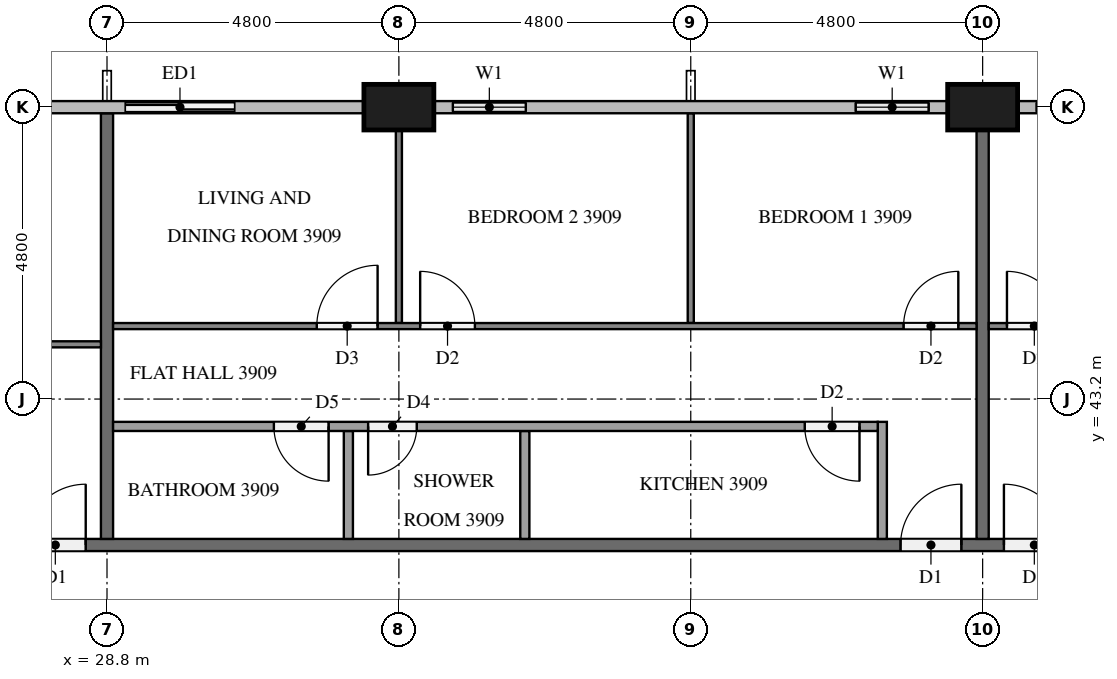
"""IFC4 building model, lengths in metres.
Left out: names, types, materials, properties, quantities, classifications, styles, units other than length and angle.
Written with IfcOpenShell. Run it as: python <this file> out.ifc"""

import sys

from ifc_helpers import new_model, si_unit, direction, frame, frame_2d, origin, origin_2d, place, context, subcontext, project, spatial, rectangle, extrude, element, fill, save


model = new_model("IFC4")
c1 = context("Model", 3, precision=1e-05, world=origin(), true_north=direction((0.0, 1.0)))
c2 = subcontext(c1, "Body", "Model", "MODEL_VIEW")
j1 = project(units=[si_unit("LENGTHUNIT", "METRE"), si_unit("PLANEANGLEUNIT", "RADIAN")], contexts=[c1])
p1 = place(None, origin())
s1 = spatial("IfcSite", under=j1, at=p1, CompositionType="ELEMENT")
p2 = place(p1, origin())
s2 = spatial("IfcBuilding", under=s1, at=p2, CompositionType="ELEMENT")
p3 = place(p2, frame((0.0, 0.0, 152.5)))
s3 = spatial("IfcBuildingStorey", under=s2, at=p3, CompositionType="ELEMENT", Elevation=152.5)
for number, where, z_axis, x_axis in (
    (1, (43.2, 48.0, 0.0), (0.0, 0.0, 1.0), (1.0, 0.0, 0.0)),
    (2, (33.6, 48.0, 0.0), (0.0, 0.0, 1.0), (1.0, 0.0, 0.0)),
):
    element("IfcColumn", number, at=place(p3, frame(where, z_axis=z_axis, x_axis=x_axis)), inside=s3, PredefinedType="COLUMN", context=c2, shape_type="SweptSolid", body=[
        extrude(rectangle(XDim=1.15, YDim=0.75, at=origin_2d()), origin(), (0.0, 0.0, 1.0), 3.2),
    ])
p4 = place(p3, frame((45.6, 48.0, 0.0), z_axis=(0.0, 0.0, 1.0), x_axis=(-1.0, 0.0, 0.0)))
e3 = element("IfcWall", 3, at=p4, inside=s3, PredefinedType="SOLIDWALL", context=c2, shape_type="SweptSolid", body=[
    extrude(rectangle(XDim=1.825, YDim=0.15, at=frame_2d((0.913, 0.0))), origin(), (0.0, 0.0, 1.0), 3.2),
])
p5 = place(p4, frame((0.312, 0.0, 0.9)))
e4 = element("IfcOpeningElement", 4, at=p5, cuts=e3, PredefinedType="OPENING", context=c2, shape_type="SweptSolid", body=[
    extrude(rectangle(XDim=1.2, YDim=1.4, at=frame_2d((0.6, 0.7))), frame((0.0, 0.085, 0.0), z_axis=(0.0, -1.0, 0.0), x_axis=(1.0, 0.0, 0.0)), (0.0, 0.0, 1.0), 0.17),
])
p6 = place(p3, frame((42.625, 48.0, 0.0), z_axis=(0.0, 0.0, 1.0), x_axis=(-1.0, 0.0, 0.0)))
e5 = element("IfcWall", 5, at=p6, inside=s3, PredefinedType="SOLIDWALL", context=c2, shape_type="SweptSolid", body=[
    extrude(rectangle(XDim=1.825, YDim=0.15, at=frame_2d((0.913, 0.0))), origin(), (0.0, 0.0, 1.0), 3.2),
])
p7 = place(p6, frame((0.312, 0.0, 0.9)))
e6 = element("IfcOpeningElement", 6, at=p7, cuts=e5, PredefinedType="OPENING", context=c2, shape_type="SweptSolid", body=[
    extrude(rectangle(XDim=1.2, YDim=1.4, at=frame_2d((0.6, 0.7))), frame((0.0, 0.085, 0.0), z_axis=(0.0, -1.0, 0.0), x_axis=(1.0, 0.0, 0.0)), (0.0, 0.0, 1.0), 0.17),
])
p8 = place(p3, frame((36.0, 48.0, 0.0), z_axis=(0.0, 0.0, 1.0), x_axis=(-1.0, 0.0, 0.0)))
e7 = element("IfcWall", 7, at=p8, inside=s3, PredefinedType="SOLIDWALL", context=c2, shape_type="SweptSolid", body=[
    extrude(rectangle(XDim=1.825, YDim=0.15, at=frame_2d((0.913, 0.0))), origin(), (0.0, 0.0, 1.0), 3.2),
])
p9 = place(p8, frame((0.312, 0.0, 0.9)))
e8 = element("IfcOpeningElement", 8, at=p9, cuts=e7, PredefinedType="OPENING", context=c2, shape_type="SweptSolid", body=[
    extrude(rectangle(XDim=1.2, YDim=1.4, at=frame_2d((0.6, 0.7))), frame((0.0, 0.085, 0.0), z_axis=(0.0, -1.0, 0.0), x_axis=(1.0, 0.0, 0.0)), (0.0, 0.0, 1.0), 0.17),
])
p10 = place(p3, frame((31.2, 48.0, 0.0), z_axis=(0.0, 0.0, 1.0), x_axis=(-1.0, 0.0, 0.0)))
e9 = element("IfcWall", 9, at=p10, inside=s3, PredefinedType="SOLIDWALL", context=c2, shape_type="SweptSolid", body=[
    extrude(rectangle(XDim=2.4, YDim=0.15, at=frame_2d((1.2, 0.0))), origin(), (0.0, 0.0, 1.0), 3.2),
])
p11 = place(p10, frame((0.3, 0.0, 0.0)))
e10 = element("IfcOpeningElement", 10, at=p11, cuts=e9, PredefinedType="OPENING", context=c2, shape_type="SweptSolid", body=[
    extrude(rectangle(XDim=1.8, YDim=2.4, at=frame_2d((0.9, 1.2))), frame((0.0, 0.085, 0.0), z_axis=(0.0, -1.0, 0.0), x_axis=(1.0, 0.0, 0.0)), (0.0, 0.0, 1.0), 0.17),
])
p12 = place(p3, frame((11.9, 40.8, 0.0), z_axis=(0.0, 0.0, 1.0), x_axis=(1.0, 0.0, 0.0)))
e11 = element("IfcWall", 11, at=p12, inside=s3, PredefinedType="PARTITIONING", context=c2, shape_type="SweptSolid", body=[
    extrude(rectangle(XDim=38.6, YDim=0.2, at=frame_2d((19.3, 0.0))), origin(), (0.0, 0.0, 1.0), 3.2),
])
p13 = place(p12, frame((31.65, 0.0, 0.0)))
e12 = element("IfcOpeningElement", 12, at=p13, cuts=e11, PredefinedType="OPENING", context=c2, shape_type="SweptSolid", body=[
    extrude(rectangle(XDim=1.0, YDim=2.1, at=frame_2d((0.5, 1.05))), frame((0.0, 0.11, 0.0), z_axis=(0.0, -1.0, 0.0), x_axis=(1.0, 0.0, 0.0)), (0.0, 0.0, 1.0), 0.22),
])
p14 = place(p12, frame((29.95, 0.0, 0.0)))
e13 = element("IfcOpeningElement", 13, at=p14, cuts=e11, PredefinedType="OPENING", context=c2, shape_type="SweptSolid", body=[
    extrude(rectangle(XDim=1.0, YDim=2.1, at=frame_2d((0.5, 1.05))), frame((0.0, 0.11, 0.0), z_axis=(0.0, -1.0, 0.0), x_axis=(1.0, 0.0, 0.0)), (0.0, 0.0, 1.0), 0.22),
])
p15 = place(p12, frame((15.55, 0.0, 0.0)))
e14 = element("IfcOpeningElement", 14, at=p15, cuts=e11, PredefinedType="OPENING", context=c2, shape_type="SweptSolid", body=[
    extrude(rectangle(XDim=1.0, YDim=2.1, at=frame_2d((0.5, 1.05))), frame((0.0, 0.11, 0.0), z_axis=(0.0, -1.0, 0.0), x_axis=(1.0, 0.0, 0.0)), (0.0, 0.0, 1.0), 0.22),
])
p16 = place(p12, frame((1.15, 0.0, 0.0)))
e15 = element("IfcOpeningElement", 15, at=p16, cuts=e11, PredefinedType="OPENING", context=c2, shape_type="SweptSolid", body=[
    extrude(rectangle(XDim=1.0, YDim=2.1, at=frame_2d((0.5, 1.05))), frame((0.0, 0.11, 0.0), z_axis=(0.0, -1.0, 0.0), x_axis=(1.0, 0.0, 0.0)), (0.0, 0.0, 1.0), 0.22),
])
p17 = place(p3, frame((43.2, 47.625, 0.0), z_axis=(0.0, 0.0, 1.0), x_axis=(0.0, -1.0, 0.0)))
e16 = element("IfcWall", 16, at=p17, inside=s3, PredefinedType="PARTITIONING", context=c2, shape_type="SweptSolid", body=[
    extrude(rectangle(XDim=6.725, YDim=0.2, at=frame_2d((3.363, 0.0))), origin(), (0.0, 0.0, 1.0), 3.2),
])
p18 = place(p3, frame((28.8, 47.9, 0.0), z_axis=(0.0, 0.0, 1.0), x_axis=(0.0, -1.0, 0.0)))
e17 = element("IfcWall", 17, at=p18, inside=s3, PredefinedType="PARTITIONING", context=c2, shape_type="SweptSolid", body=[
    extrude(rectangle(XDim=7.0, YDim=0.2, at=frame_2d((3.5, 0.0))), origin(), (0.0, 0.0, 1.0), 3.2),
])
p19 = place(p3, frame((43.3, 44.4, 0.0), z_axis=(0.0, 0.0, 1.0), x_axis=(1.0, 0.0, 0.0)))
e18 = element("IfcWall", 18, at=p19, inside=s3, PredefinedType="PARTITIONING", context=c2, shape_type="SweptSolid", body=[
    extrude(rectangle(XDim=13.878, YDim=0.1, at=frame_2d((6.939, 0.0))), origin(), (0.0, 0.0, 1.0), 3.2),
])
p20 = place(p19, frame((0.3, 0.0, 0.0)))
e19 = element("IfcOpeningElement", 19, at=p20, cuts=e18, PredefinedType="OPENING", context=c2, shape_type="SweptSolid", body=[
    extrude(rectangle(XDim=0.9, YDim=2.1, at=frame_2d((0.45, 1.05))), frame((0.0, 0.06, 0.0), z_axis=(0.0, -1.0, 0.0), x_axis=(1.0, 0.0, 0.0)), (0.0, 0.0, 1.0), 0.12),
])
p21 = place(p19, frame((8.15, 0.0, 0.0)))
e20 = element("IfcOpeningElement", 20, at=p21, cuts=e18, PredefinedType="OPENING", context=c2, shape_type="SweptSolid", body=[
    extrude(rectangle(XDim=1.0, YDim=2.1, at=frame_2d((0.5, 1.05))), frame((0.0, 0.06, 0.0), z_axis=(0.0, -1.0, 0.0), x_axis=(1.0, 0.0, 0.0)), (0.0, 0.0, 1.0), 0.12),
])
p22 = place(p19, frame((9.85, 0.0, 0.0)))
e21 = element("IfcOpeningElement", 21, at=p22, cuts=e18, PredefinedType="OPENING", context=c2, shape_type="SweptSolid", body=[
    extrude(rectangle(XDim=0.9, YDim=2.1, at=frame_2d((0.45, 1.05))), frame((0.0, 0.06, 0.0), z_axis=(0.0, -1.0, 0.0), x_axis=(1.0, 0.0, 0.0)), (0.0, 0.0, 1.0), 0.12),
])
p23 = place(p3, frame((38.4, 44.45, 0.0), z_axis=(0.0, 0.0, 1.0), x_axis=(0.0, 1.0, 0.0)))
e22 = element("IfcWall", 22, at=p23, inside=s3, PredefinedType="PARTITIONING", context=c2, shape_type="SweptSolid", body=[
    extrude(rectangle(XDim=3.45, YDim=0.1, at=frame_2d((1.725, 0.0))), origin(), (0.0, 0.0, 1.0), 3.2),
])
p24 = place(p3, frame((33.6, 44.45, 0.0), z_axis=(0.0, 0.0, 1.0), x_axis=(0.0, 1.0, 0.0)))
e23 = element("IfcWall", 23, at=p24, inside=s3, PredefinedType="PARTITIONING", context=c2, shape_type="SweptSolid", body=[
    extrude(rectangle(XDim=3.175, YDim=0.1, at=frame_2d((1.587, 0.0))), origin(), (0.0, 0.0, 1.0), 3.2),
])
p25 = place(p3, frame((28.9, 44.4, 0.0), z_axis=(0.0, 0.0, 1.0), x_axis=(1.0, 0.0, 0.0)))
e24 = element("IfcWall", 24, at=p25, inside=s3, PredefinedType="PARTITIONING", context=c2, shape_type="SweptSolid", body=[
    extrude(rectangle(XDim=14.2, YDim=0.1, at=frame_2d((7.1, 0.0))), origin(), (0.0, 0.0, 1.0), 3.2),
])
p26 = place(p25, frame((13.0, 0.0, 0.0)))
e25 = element("IfcOpeningElement", 25, at=p26, cuts=e24, PredefinedType="OPENING", context=c2, shape_type="SweptSolid", body=[
    extrude(rectangle(XDim=0.9, YDim=2.1, at=frame_2d((0.45, 1.05))), frame((0.0, 0.06, 0.0), z_axis=(0.0, -1.0, 0.0), x_axis=(1.0, 0.0, 0.0)), (0.0, 0.0, 1.0), 0.12),
])
p27 = place(p25, frame((5.05, 0.0, 0.0)))
e26 = element("IfcOpeningElement", 26, at=p27, cuts=e24, PredefinedType="OPENING", context=c2, shape_type="SweptSolid", body=[
    extrude(rectangle(XDim=0.9, YDim=2.1, at=frame_2d((0.45, 1.05))), frame((0.0, 0.06, 0.0), z_axis=(0.0, -1.0, 0.0), x_axis=(1.0, 0.0, 0.0)), (0.0, 0.0, 1.0), 0.12),
])
p28 = place(p25, frame((3.35, 0.0, 0.0)))
e27 = element("IfcOpeningElement", 27, at=p28, cuts=e24, PredefinedType="OPENING", context=c2, shape_type="SweptSolid", body=[
    extrude(rectangle(XDim=1.0, YDim=2.1, at=frame_2d((0.5, 1.05))), frame((0.0, 0.06, 0.0), z_axis=(0.0, -1.0, 0.0), x_axis=(1.0, 0.0, 0.0)), (0.0, 0.0, 1.0), 0.12),
])
for number, where, z_axis, x_axis in (
    (28, (35.671, 40.9, 0.0), (0.0, 0.0, 1.0), (0.0, 1.0, 0.0)),
    (29, (32.769, 40.9, 0.0), (0.0, 0.0, 1.0), (0.0, 1.0, 0.0)),
):
    element("IfcWall", number, at=place(p3, frame(where, z_axis=z_axis, x_axis=x_axis)), inside=s3, PredefinedType="PARTITIONING", context=c2, shape_type="SweptSolid", body=[
        extrude(rectangle(XDim=1.775, YDim=0.15, at=frame_2d((0.888, 0.0))), origin(), (0.0, 0.0, 1.0), 3.2),
    ])
p29 = place(p3, frame((41.55, 40.9, 0.0), z_axis=(0.0, 0.0, 1.0), x_axis=(0.0, 1.0, 0.0)))
e30 = element("IfcWall", 30, at=p29, inside=s3, PredefinedType="PARTITIONING", context=c2, shape_type="SweptSolid", body=[
    extrude(rectangle(XDim=1.925, YDim=0.15, at=frame_2d((0.962, 0.0))), origin(), (0.0, 0.0, 1.0), 3.2),
])
p30 = place(p3, frame((41.475, 42.75, 0.0), z_axis=(0.0, 0.0, 1.0), x_axis=(-1.0, 0.0, 0.0)))
e31 = element("IfcWall", 31, at=p30, inside=s3, PredefinedType="PARTITIONING", context=c2, shape_type="SweptSolid", body=[
    extrude(rectangle(XDim=12.575, YDim=0.15, at=frame_2d((6.288, 0.0))), origin(), (0.0, 0.0, 1.0), 3.2),
])
p31 = place(p30, frame((0.3, 0.0, 0.0)))
e32 = element("IfcOpeningElement", 32, at=p31, cuts=e31, PredefinedType="OPENING", context=c2, shape_type="SweptSolid", body=[
    extrude(rectangle(XDim=0.9, YDim=2.1, at=frame_2d((0.45, 1.05))), frame((0.0, 0.085, 0.0), z_axis=(0.0, -1.0, 0.0), x_axis=(1.0, 0.0, 0.0)), (0.0, 0.0, 1.0), 0.17),
])
p32 = place(p30, frame((7.581, 0.0, 0.0)))
e33 = element("IfcOpeningElement", 33, at=p32, cuts=e31, PredefinedType="OPENING", context=c2, shape_type="SweptSolid", body=[
    extrude(rectangle(XDim=0.8, YDim=2.1, at=frame_2d((0.4, 1.05))), frame((0.0, 0.085, 0.0), z_axis=(0.0, -1.0, 0.0), x_axis=(1.0, 0.0, 0.0)), (0.0, 0.0, 1.0), 0.17),
])
p33 = place(p30, frame((9.031, 0.0, 0.0)))
e34 = element("IfcOpeningElement", 34, at=p33, cuts=e31, PredefinedType="OPENING", context=c2, shape_type="SweptSolid", body=[
    extrude(rectangle(XDim=0.9, YDim=2.1, at=frame_2d((0.45, 1.05))), frame((0.0, 0.085, 0.0), z_axis=(0.0, -1.0, 0.0), x_axis=(1.0, 0.0, 0.0)), (0.0, 0.0, 1.0), 0.17),
])
p34 = place(p3, frame((14.5, 44.1, 0.0), z_axis=(0.0, 0.0, 1.0), x_axis=(1.0, 0.0, 0.0)))
e35 = element("IfcWall", 35, at=p34, inside=s3, PredefinedType="PARTITIONING", context=c2, shape_type="SweptSolid", body=[
    extrude(rectangle(XDim=14.2, YDim=0.1, at=frame_2d((7.1, 0.0))), origin(), (0.0, 0.0, 1.0), 3.2),
])
p35 = place(p34, frame((9.85, 0.0, 0.0)))
e36 = element("IfcOpeningElement", 36, at=p35, cuts=e35, PredefinedType="OPENING", context=c2, shape_type="SweptSolid", body=[
    extrude(rectangle(XDim=0.9, YDim=2.1, at=frame_2d((0.45, 1.05))), frame((0.0, 0.06, 0.0), z_axis=(0.0, -1.0, 0.0), x_axis=(1.0, 0.0, 0.0)), (0.0, 0.0, 1.0), 0.12),
])
p36 = place(p34, frame((8.25, 0.0, 0.0)))
e37 = element("IfcOpeningElement", 37, at=p36, cuts=e35, PredefinedType="OPENING", context=c2, shape_type="SweptSolid", body=[
    extrude(rectangle(XDim=0.9, YDim=2.1, at=frame_2d((0.45, 1.05))), frame((0.0, 0.06, 0.0), z_axis=(0.0, -1.0, 0.0), x_axis=(1.0, 0.0, 0.0)), (0.0, 0.0, 1.0), 0.12),
])
p37 = place(p34, frame((0.3, 0.0, 0.0)))
e38 = element("IfcOpeningElement", 38, at=p37, cuts=e35, PredefinedType="OPENING", context=c2, shape_type="SweptSolid", body=[
    extrude(rectangle(XDim=1.0, YDim=2.1, at=frame_2d((0.5, 1.05))), frame((0.0, 0.06, 0.0), z_axis=(0.0, -1.0, 0.0), x_axis=(1.0, 0.0, 0.0)), (0.0, 0.0, 1.0), 0.12),
])
p38 = place(p5, origin())
e39 = element("IfcWindow", 39, at=p38, inside=s3, PartitioningType="SINGLE_PANEL", PredefinedType="WINDOW", context=c2, shape_type="SweptSolid", body=[
    extrude(rectangle(XDim=1.2, YDim=1.4, at=frame_2d((0.6, 0.7))), frame((0.0, 0.03, 0.0), z_axis=(0.0, -1.0, 0.0), x_axis=(1.0, 0.0, 0.0)), (0.0, 0.0, 1.0), 0.06),
])
fill(e4, e39)
p39 = place(p7, origin())
e40 = element("IfcWindow", 40, at=p39, inside=s3, PartitioningType="SINGLE_PANEL", PredefinedType="WINDOW", context=c2, shape_type="SweptSolid", body=[
    extrude(rectangle(XDim=1.2, YDim=1.4, at=frame_2d((0.6, 0.7))), frame((0.0, 0.03, 0.0), z_axis=(0.0, -1.0, 0.0), x_axis=(1.0, 0.0, 0.0)), (0.0, 0.0, 1.0), 0.06),
])
fill(e6, e40)
p40 = place(p9, origin())
e41 = element("IfcWindow", 41, at=p40, inside=s3, PartitioningType="SINGLE_PANEL", PredefinedType="WINDOW", context=c2, shape_type="SweptSolid", body=[
    extrude(rectangle(XDim=1.2, YDim=1.4, at=frame_2d((0.6, 0.7))), frame((0.0, 0.03, 0.0), z_axis=(0.0, -1.0, 0.0), x_axis=(1.0, 0.0, 0.0)), (0.0, 0.0, 1.0), 0.06),
])
fill(e8, e41)
p41 = place(p11, origin())
e42 = element("IfcDoor", 42, at=p41, inside=s3, OperationType="SLIDING_TO_LEFT", PredefinedType="DOOR", context=c2, shape_type="SweptSolid", body=[
    extrude(rectangle(XDim=1.8, YDim=2.4, at=frame_2d((0.9, 1.2))), frame((0.0, 0.025, 0.0), z_axis=(0.0, -1.0, 0.0), x_axis=(1.0, 0.0, 0.0)), (0.0, 0.0, 1.0), 0.05),
])
fill(e10, e42)
p42 = place(p13, origin())
e43 = element("IfcDoor", 43, at=p42, inside=s3, OperationType="SINGLE_SWING_LEFT", PredefinedType="DOOR", context=c2, shape_type="SweptSolid", body=[
    extrude(rectangle(XDim=1.0, YDim=2.1, at=frame_2d((0.5, 1.05))), frame((0.0, 0.025, 0.0), z_axis=(0.0, -1.0, 0.0), x_axis=(1.0, 0.0, 0.0)), (0.0, 0.0, 1.0), 0.05),
])
fill(e12, e43)
p43 = place(p14, origin())
e44 = element("IfcDoor", 44, at=p43, inside=s3, OperationType="SINGLE_SWING_RIGHT", PredefinedType="DOOR", context=c2, shape_type="SweptSolid", body=[
    extrude(rectangle(XDim=1.0, YDim=2.1, at=frame_2d((0.5, 1.05))), frame((0.0, 0.025, 0.0), z_axis=(0.0, -1.0, 0.0), x_axis=(1.0, 0.0, 0.0)), (0.0, 0.0, 1.0), 0.05),
])
fill(e13, e44)
p44 = place(p15, origin())
e45 = element("IfcDoor", 45, at=p44, inside=s3, OperationType="SINGLE_SWING_RIGHT", PredefinedType="DOOR", context=c2, shape_type="SweptSolid", body=[
    extrude(rectangle(XDim=1.0, YDim=2.1, at=frame_2d((0.5, 1.05))), frame((0.0, 0.025, 0.0), z_axis=(0.0, -1.0, 0.0), x_axis=(1.0, 0.0, 0.0)), (0.0, 0.0, 1.0), 0.05),
])
fill(e14, e45)
p45 = place(p20, origin())
e46 = element("IfcDoor", 46, at=p45, inside=s3, OperationType="SINGLE_SWING_LEFT", PredefinedType="DOOR", context=c2, shape_type="SweptSolid", body=[
    extrude(rectangle(XDim=0.9, YDim=2.1, at=frame_2d((0.45, 1.05))), frame((0.0, 0.025, 0.0), z_axis=(0.0, -1.0, 0.0), x_axis=(1.0, 0.0, 0.0)), (0.0, 0.0, 1.0), 0.05),
])
fill(e19, e46)
p46 = place(p26, origin())
e47 = element("IfcDoor", 47, at=p46, inside=s3, OperationType="SINGLE_SWING_RIGHT", PredefinedType="DOOR", context=c2, shape_type="SweptSolid", body=[
    extrude(rectangle(XDim=0.9, YDim=2.1, at=frame_2d((0.45, 1.05))), frame((0.0, 0.025, 0.0), z_axis=(0.0, -1.0, 0.0), x_axis=(1.0, 0.0, 0.0)), (0.0, 0.0, 1.0), 0.05),
])
fill(e25, e47)
p47 = place(p27, origin())
e48 = element("IfcDoor", 48, at=p47, inside=s3, OperationType="SINGLE_SWING_LEFT", PredefinedType="DOOR", context=c2, shape_type="SweptSolid", body=[
    extrude(rectangle(XDim=0.9, YDim=2.1, at=frame_2d((0.45, 1.05))), frame((0.0, 0.025, 0.0), z_axis=(0.0, -1.0, 0.0), x_axis=(1.0, 0.0, 0.0)), (0.0, 0.0, 1.0), 0.05),
])
fill(e26, e48)
p48 = place(p28, origin())
e49 = element("IfcDoor", 49, at=p48, inside=s3, OperationType="SINGLE_SWING_RIGHT", PredefinedType="DOOR", context=c2, shape_type="SweptSolid", body=[
    extrude(rectangle(XDim=1.0, YDim=2.1, at=frame_2d((0.5, 1.05))), frame((0.0, 0.025, 0.0), z_axis=(0.0, -1.0, 0.0), x_axis=(1.0, 0.0, 0.0)), (0.0, 0.0, 1.0), 0.05),
])
fill(e27, e49)
p49 = place(p31, origin())
e50 = element("IfcDoor", 50, at=p49, inside=s3, OperationType="SINGLE_SWING_LEFT", PredefinedType="DOOR", context=c2, shape_type="SweptSolid", body=[
    extrude(rectangle(XDim=0.9, YDim=2.1, at=frame_2d((0.45, 1.05))), frame((0.0, 0.025, 0.0), z_axis=(0.0, -1.0, 0.0), x_axis=(1.0, 0.0, 0.0)), (0.0, 0.0, 1.0), 0.05),
])
fill(e32, e50)
p50 = place(p32, origin())
e51 = element("IfcDoor", 51, at=p50, inside=s3, OperationType="SINGLE_SWING_RIGHT", PredefinedType="DOOR", context=c2, shape_type="SweptSolid", body=[
    extrude(rectangle(XDim=0.8, YDim=2.1, at=frame_2d((0.4, 1.05))), frame((0.0, 0.025, 0.0), z_axis=(0.0, -1.0, 0.0), x_axis=(1.0, 0.0, 0.0)), (0.0, 0.0, 1.0), 0.05),
])
fill(e33, e51)
p51 = place(p33, origin())
e52 = element("IfcDoor", 52, at=p51, inside=s3, OperationType="SINGLE_SWING_LEFT", PredefinedType="DOOR", context=c2, shape_type="SweptSolid", body=[
    extrude(rectangle(XDim=0.9, YDim=2.1, at=frame_2d((0.45, 1.05))), frame((0.0, 0.025, 0.0), z_axis=(0.0, -1.0, 0.0), x_axis=(1.0, 0.0, 0.0)), (0.0, 0.0, 1.0), 0.05),
])
fill(e34, e52)
save(model, sys.argv[1])
